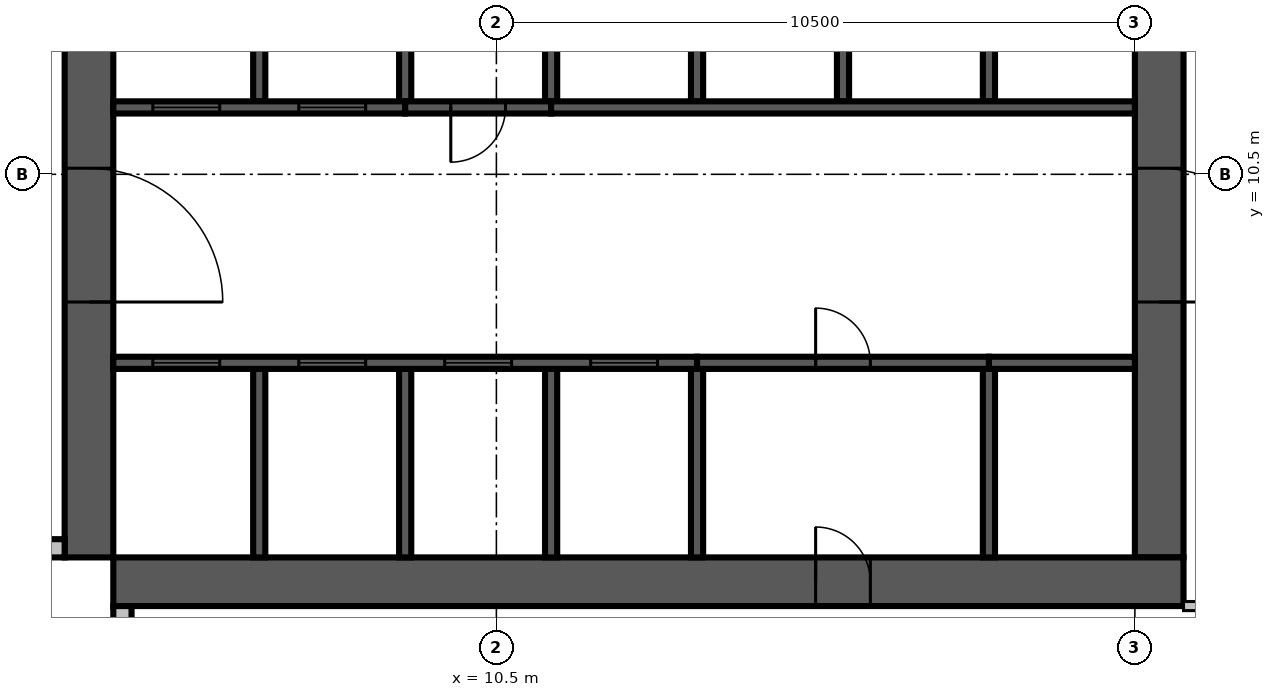
"""IFC4 building model, lengths in metres.
Left out: names, types, materials, properties, quantities, classifications, styles, units other than length and angle.
Written with IfcOpenShell. Run it as: python <this file> out.ifc"""

import sys

from ifc_helpers import new_model, si_unit, direction, frame, frame_2d, origin, place, context, subcontext, project, spatial, rectangle, extrude, source, transform, mapped, element, fill, save


model = new_model("IFC4")
c1 = context("Model", 3, precision=1e-05, world=origin(), true_north=direction((0.0, 1.0)))
c2 = subcontext(c1, "Body", "Model", "MODEL_VIEW")
j1 = project(units=[si_unit("LENGTHUNIT", "METRE"), si_unit("PLANEANGLEUNIT", "RADIAN")], contexts=[c1])
p1 = place(None, origin())
s1 = spatial("IfcSite", under=j1, at=p1, CompositionType="ELEMENT")
p2 = place(p1, origin())
s2 = spatial("IfcBuilding", under=s1, at=p2, CompositionType="ELEMENT")
p3 = place(p2, frame((0.0, 0.0, 234.8)))
s3 = spatial("IfcBuildingStorey", under=s2, at=p3, CompositionType="ELEMENT", Elevation=234.8)
m1 = source(origin(), c2, "Body", "SweptSolid", [
    extrude(rectangle(XDim=17.6, YDim=0.8, at=frame_2d((8.8, 0.0))), origin(), (0.0, 0.0, 1.0), 3.8),
])
p4 = place(p3, frame((3.8, 4.2, 0.0), z_axis=(0.0, 0.0, 1.0), x_axis=(0.0, 1.0, 0.0)))
e1 = element("IfcWall", 1, at=p4, inside=s3, PredefinedType="SHEAR", context=c2, shape_type="MappedRepresentation", body=[
    mapped(m1, transform((0.0, 0.0, 0.0), scale=1.0)),
])
m2 = source(origin(), c2, "Body", "SweptSolid", [
    extrude(rectangle(XDim=2.2, YDim=2.1, at=frame_2d((1.1, 1.05))), frame((0.0, 0.41, 0.0), z_axis=(0.0, -1.0, 0.0), x_axis=(1.0, 0.0, 0.0)), (0.0, 0.0, 1.0), 0.82),
])
p5 = place(p4, frame((4.2, 0.0, 0.0)))
e2 = element("IfcOpeningElement", 2, at=p5, cuts=e1, PredefinedType="OPENING", context=c2, shape_type="MappedRepresentation", body=[
    mapped(m2, transform((0.0, 0.0, 0.0), scale=1.0)),
])
m3 = source(origin(), c2, "Body", "SweptSolid", [
    extrude(rectangle(XDim=0.9, YDim=2.1, at=frame_2d((0.45, 1.05))), frame((0.0, 0.41, 0.0), z_axis=(0.0, -1.0, 0.0), x_axis=(1.0, 0.0, 0.0)), (0.0, 0.0, 1.0), 0.82),
])
p6 = place(p4, frame((10.95, 0.0, 0.0)))
e3 = element("IfcOpeningElement", 3, at=p6, cuts=e1, PredefinedType="OPENING", context=c2, shape_type="MappedRepresentation", body=[
    mapped(m3, transform((0.0, 0.0, 0.0), scale=1.0)),
])
m4 = source(origin(), c2, "Body", "SweptSolid", [
    extrude(rectangle(XDim=16.8, YDim=0.8, at=frame_2d((8.4, 0.0))), origin(), (0.0, 0.0, 1.0), 3.8),
])
p7 = place(p3, frame((21.4, 4.2, 0.0), z_axis=(0.0, 0.0, 1.0), x_axis=(0.0, 1.0, 0.0)))
e4 = element("IfcWall", 4, at=p7, inside=s3, PredefinedType="SHEAR", context=c2, shape_type="MappedRepresentation", body=[
    mapped(m4, transform((0.0, 0.0, 0.0), scale=1.0)),
])
p8 = place(p7, frame((4.2, 0.0, 0.0)))
e5 = element("IfcOpeningElement", 5, at=p8, cuts=e4, PredefinedType="OPENING", context=c2, shape_type="MappedRepresentation", body=[
    mapped(m2, transform((0.0, 0.0, 0.0), scale=1.0)),
])
m5 = source(origin(), c2, "Body", "SweptSolid", [
    extrude(rectangle(XDim=1.2, YDim=2.1, at=frame_2d((0.6, 1.05))), frame((0.0, 0.41, 0.0), z_axis=(0.0, -1.0, 0.0), x_axis=(1.0, 0.0, 0.0)), (0.0, 0.0, 1.0), 0.82),
])
p9 = place(p7, frame((14.7, 0.0, 0.0)))
e6 = element("IfcOpeningElement", 6, at=p9, cuts=e4, PredefinedType="OPENING", context=c2, shape_type="MappedRepresentation", body=[
    mapped(m5, transform((0.0, 0.0, 0.0), scale=1.0)),
])
p10 = place(p3, frame((4.2, 3.8, 0.0), z_axis=(0.0, 0.0, 1.0), x_axis=(1.0, 0.0, 0.0)))
e7 = element("IfcWall", 7, at=p10, inside=s3, PredefinedType="SHEAR", context=c2, shape_type="MappedRepresentation", body=[
    mapped(m1, transform((0.0, 0.0, 0.0), scale=1.0)),
])
p11 = place(p10, frame((11.55, 0.0, 0.0)))
e8 = element("IfcOpeningElement", 8, at=p11, cuts=e7, PredefinedType="OPENING", context=c2, shape_type="MappedRepresentation", body=[
    mapped(m3, transform((0.0, 0.0, 0.0), scale=1.0)),
])
m6 = source(origin(), c2, "Body", "SweptSolid", [
    extrude(rectangle(XDim=3.4, YDim=0.3, at=frame_2d((1.7, 0.0))), origin(), (0.0, 0.0, 1.0), 3.4),
])
p12 = place(p3, frame((0.0, 4.35, 0.0), z_axis=(0.0, 0.0, 1.0), x_axis=(1.0, 0.0, 0.0)))
e9 = element("IfcWall", 9, at=p12, inside=s3, PredefinedType="STANDARD", context=c2, shape_type="MappedRepresentation", body=[
    mapped(m6, transform((0.0, 0.0, 0.0), scale=1.0)),
])
m7 = source(origin(), c2, "Body", "SweptSolid", [
    extrude(rectangle(XDim=1.8, YDim=2.3, at=frame_2d((0.9, 1.15))), frame((0.0, 0.16, 0.0), z_axis=(0.0, -1.0, 0.0), x_axis=(1.0, 0.0, 0.0)), (0.0, 0.0, 1.0), 0.32),
])
p13 = place(p12, frame((1.2, 0.0, 0.6)))
e10 = element("IfcOpeningElement", 10, at=p13, cuts=e9, PredefinedType="OPENING", context=c2, shape_type="MappedRepresentation", body=[
    mapped(m7, transform((0.0, 0.0, 0.0), scale=1.0)),
])
p14 = place(p3, frame((4.35, 3.4, 0.0), z_axis=(0.0, 0.0, 1.0), x_axis=(0.0, -1.0, 0.0)))
e11 = element("IfcWall", 11, at=p14, inside=s3, PredefinedType="STANDARD", context=c2, shape_type="MappedRepresentation", body=[
    mapped(m6, transform((0.0, 0.0, 0.0), scale=1.0)),
])
p15 = place(p14, frame((0.4, 0.0, 0.6)))
e12 = element("IfcOpeningElement", 12, at=p15, cuts=e11, PredefinedType="OPENING", context=c2, shape_type="MappedRepresentation", body=[
    mapped(m7, transform((0.0, 0.0, 0.0), scale=1.0)),
])
m8 = source(origin(), c2, "Body", "SweptSolid", [
    extrude(rectangle(XDim=3.1, YDim=0.2, at=frame_2d((1.55, 0.0))), origin(), (0.0, 0.0, 1.0), 3.8),
])
for number, where, z_axis, x_axis in (
    (13, (6.6, 4.2, 0.0), (0.0, 0.0, 1.0), (0.0, 1.0, 0.0)),
    (14, (9.0, 4.2, 0.0), (0.0, 0.0, 1.0), (0.0, 1.0, 0.0)),
    (15, (11.4, 4.2, 0.0), (0.0, 0.0, 1.0), (0.0, 1.0, 0.0)),
):
    element("IfcWall", number, at=place(p3, frame(where, z_axis=z_axis, x_axis=x_axis)), inside=s3, PredefinedType="SOLIDWALL", context=c2, shape_type="MappedRepresentation", body=[
        mapped(m8, transform((0.0, 0.0, 0.0), scale=1.0)),
    ])
m9 = source(origin(), c2, "Body", "SweptSolid", [
    extrude(rectangle(XDim=3.1, YDim=0.2, at=frame_2d((1.55, 0.0))), origin(), (0.0, 0.0, 1.0), 3.4),
])
for number, where, z_axis, x_axis in (
    (16, (13.8, 4.2, 0.0), (0.0, 0.0, 1.0), (0.0, 1.0, 0.0)),
    (17, (18.6, 4.2, 0.0), (0.0, 0.0, 1.0), (0.0, 1.0, 0.0)),
):
    element("IfcWall", number, at=place(p3, frame(where, z_axis=z_axis, x_axis=x_axis)), inside=s3, PredefinedType="SOLIDWALL", context=c2, shape_type="MappedRepresentation", body=[
        mapped(m9, transform((0.0, 0.0, 0.0), scale=1.0)),
    ])
m10 = source(origin(), c2, "Body", "SweptSolid", [
    extrude(rectangle(XDim=3.0, YDim=0.2, at=frame_2d((1.5, 0.0))), origin(), (0.0, 0.0, 1.0), 3.8),
])
p16 = place(p3, frame((6.6, 11.7, 0.0), z_axis=(0.0, 0.0, 1.0), x_axis=(0.0, 1.0, 0.0)))
e18 = element("IfcWall", 18, at=p16, inside=s3, PredefinedType="SOLIDWALL", context=c2, shape_type="MappedRepresentation", body=[
    mapped(m10, transform((0.0, 0.0, 0.0), scale=1.0)),
])
m11 = source(origin(), c2, "Body", "SweptSolid", [
    extrude(rectangle(XDim=3.0, YDim=0.2, at=frame_2d((1.5, 0.0))), origin(), (0.0, 0.0, 1.0), 3.4),
])
for number, where, z_axis, x_axis in (
    (19, (9.0, 11.7, 0.0), (0.0, 0.0, 1.0), (0.0, 1.0, 0.0)),
    (20, (11.4, 11.7, 0.0), (0.0, 0.0, 1.0), (0.0, 1.0, 0.0)),
):
    element("IfcWall", number, at=place(p3, frame(where, z_axis=z_axis, x_axis=x_axis)), inside=s3, PredefinedType="SOLIDWALL", context=c2, shape_type="MappedRepresentation", body=[
        mapped(m11, transform((0.0, 0.0, 0.0), scale=1.0)),
    ])
for number, where, z_axis, x_axis in (
    (21, (13.8, 11.7, 0.0), (0.0, 0.0, 1.0), (0.0, 1.0, 0.0)),
    (22, (16.2, 11.7, 0.0), (0.0, 0.0, 1.0), (0.0, 1.0, 0.0)),
    (23, (18.6, 11.7, 0.0), (0.0, 0.0, 1.0), (0.0, 1.0, 0.0)),
):
    element("IfcWall", number, at=place(p3, frame(where, z_axis=z_axis, x_axis=x_axis)), inside=s3, PredefinedType="SOLIDWALL", context=c2, shape_type="MappedRepresentation", body=[
        mapped(m10, transform((0.0, 0.0, 0.0), scale=1.0)),
    ])
m12 = source(origin(), c2, "Body", "SweptSolid", [
    extrude(rectangle(XDim=9.6, YDim=0.2, at=frame_2d((4.8, 0.0))), origin(), (0.0, 0.0, 1.0), 3.8),
])
p17 = place(p3, frame((4.2, 7.4, 0.0), z_axis=(0.0, 0.0, 1.0), x_axis=(1.0, 0.0, 0.0)))
e24 = element("IfcWall", 24, at=p17, inside=s3, PredefinedType="SOLIDWALL", context=c2, shape_type="MappedRepresentation", body=[
    mapped(m12, transform((0.0, 0.0, 0.0), scale=1.0)),
])
m13 = source(origin(), c2, "Body", "SweptSolid", [
    extrude(rectangle(XDim=1.1, YDim=2.1, at=frame_2d((0.55, 1.05))), frame((0.0, 0.11, 0.0), z_axis=(0.0, -1.0, 0.0), x_axis=(1.0, 0.0, 0.0)), (0.0, 0.0, 1.0), 0.22),
])
p18 = place(p17, frame((0.65, 0.0, 0.0)))
e25 = element("IfcOpeningElement", 25, at=p18, cuts=e24, PredefinedType="OPENING", context=c2, shape_type="MappedRepresentation", body=[
    mapped(m13, transform((0.0, 0.0, 0.0), scale=1.0)),
])
p19 = place(p17, frame((3.05, 0.0, 0.0)))
e26 = element("IfcOpeningElement", 26, at=p19, cuts=e24, PredefinedType="OPENING", context=c2, shape_type="MappedRepresentation", body=[
    mapped(m13, transform((0.0, 0.0, 0.0), scale=1.0)),
])
p20 = place(p17, frame((5.45, 0.0, 0.0)))
e27 = element("IfcOpeningElement", 27, at=p20, cuts=e24, PredefinedType="OPENING", context=c2, shape_type="MappedRepresentation", body=[
    mapped(m13, transform((0.0, 0.0, 0.0), scale=1.0)),
])
p21 = place(p17, frame((7.85, 0.0, 0.0)))
e28 = element("IfcOpeningElement", 28, at=p21, cuts=e24, PredefinedType="OPENING", context=c2, shape_type="MappedRepresentation", body=[
    mapped(m13, transform((0.0, 0.0, 0.0), scale=1.0)),
])
m14 = source(origin(), c2, "Body", "SweptSolid", [
    extrude(rectangle(XDim=4.8, YDim=0.2, at=frame_2d((2.4, 0.0))), origin(), (0.0, 0.0, 1.0), 3.4),
])
p22 = place(p3, frame((13.8, 7.4, 0.0), z_axis=(0.0, 0.0, 1.0), x_axis=(1.0, 0.0, 0.0)))
e29 = element("IfcWall", 29, at=p22, inside=s3, PredefinedType="SOLIDWALL", context=c2, shape_type="MappedRepresentation", body=[
    mapped(m14, transform((0.0, 0.0, 0.0), scale=1.0)),
])
m15 = source(origin(), c2, "Body", "SweptSolid", [
    extrude(rectangle(XDim=0.9, YDim=2.1, at=frame_2d((0.45, 1.05))), frame((0.0, 0.11, 0.0), z_axis=(0.0, -1.0, 0.0), x_axis=(1.0, 0.0, 0.0)), (0.0, 0.0, 1.0), 0.22),
])
p23 = place(p22, frame((1.95, 0.0, 0.0)))
e30 = element("IfcOpeningElement", 30, at=p23, cuts=e29, PredefinedType="OPENING", context=c2, shape_type="MappedRepresentation", body=[
    mapped(m15, transform((0.0, 0.0, 0.0), scale=1.0)),
])
m16 = source(origin(), c2, "Body", "SweptSolid", [
    extrude(rectangle(XDim=2.4, YDim=0.2, at=frame_2d((1.2, 0.0))), origin(), (0.0, 0.0, 1.0), 3.8),
])
p24 = place(p3, frame((18.6, 7.4, 0.0), z_axis=(0.0, 0.0, 1.0), x_axis=(1.0, 0.0, 0.0)))
e31 = element("IfcWall", 31, at=p24, inside=s3, PredefinedType="SOLIDWALL", context=c2, shape_type="MappedRepresentation", body=[
    mapped(m16, transform((0.0, 0.0, 0.0), scale=1.0)),
])
m17 = source(origin(), c2, "Body", "SweptSolid", [
    extrude(rectangle(XDim=4.8, YDim=0.2, at=frame_2d((2.4, 0.0))), origin(), (0.0, 0.0, 1.0), 3.8),
])
p25 = place(p3, frame((4.2, 11.6, 0.0), z_axis=(0.0, 0.0, 1.0), x_axis=(1.0, 0.0, 0.0)))
e32 = element("IfcWall", 32, at=p25, inside=s3, PredefinedType="SOLIDWALL", context=c2, shape_type="MappedRepresentation", body=[
    mapped(m17, transform((0.0, 0.0, 0.0), scale=1.0)),
])
p26 = place(p25, frame((0.65, 0.0, 0.0)))
e33 = element("IfcOpeningElement", 33, at=p26, cuts=e32, PredefinedType="OPENING", context=c2, shape_type="MappedRepresentation", body=[
    mapped(m13, transform((0.0, 0.0, 0.0), scale=1.0)),
])
p27 = place(p25, frame((3.05, 0.0, 0.0)))
e34 = element("IfcOpeningElement", 34, at=p27, cuts=e32, PredefinedType="OPENING", context=c2, shape_type="MappedRepresentation", body=[
    mapped(m13, transform((0.0, 0.0, 0.0), scale=1.0)),
])
m18 = source(origin(), c2, "Body", "SweptSolid", [
    extrude(rectangle(XDim=2.4, YDim=0.2, at=frame_2d((1.2, 0.0))), origin(), (0.0, 0.0, 1.0), 3.4),
])
p28 = place(p3, frame((9.0, 11.6, 0.0), z_axis=(0.0, 0.0, 1.0), x_axis=(1.0, 0.0, 0.0)))
e35 = element("IfcWall", 35, at=p28, inside=s3, PredefinedType="SOLIDWALL", context=c2, shape_type="MappedRepresentation", body=[
    mapped(m18, transform((0.0, 0.0, 0.0), scale=1.0)),
])
p29 = place(p28, frame((0.75, 0.0, 0.0)))
e36 = element("IfcOpeningElement", 36, at=p29, cuts=e35, PredefinedType="OPENING", context=c2, shape_type="MappedRepresentation", body=[
    mapped(m15, transform((0.0, 0.0, 0.0), scale=1.0)),
])
p30 = place(p3, frame((11.4, 11.6, 0.0), z_axis=(0.0, 0.0, 1.0), x_axis=(1.0, 0.0, 0.0)))
e37 = element("IfcWall", 37, at=p30, inside=s3, PredefinedType="SOLIDWALL", context=c2, shape_type="MappedRepresentation", body=[
    mapped(m12, transform((0.0, 0.0, 0.0), scale=1.0)),
])
m19 = source(origin(), c2, "Body", "SweptSolid", [
    extrude(rectangle(XDim=7.525, YDim=0.15, at=frame_2d((3.763, 0.0))), origin(), (0.0, 0.0, 1.0), 3.4),
])
p31 = place(p3, frame((21.8, 3.4, 0.0), z_axis=(0.0, 0.0, 1.0), x_axis=(1.0, 0.0, 0.0)))
e38 = element("IfcWall", 38, at=p31, inside=s3, PredefinedType="PARTITIONING", context=c2, shape_type="MappedRepresentation", body=[
    mapped(m19, transform((0.0, 0.0, 0.0), scale=1.0)),
])
m20 = source(origin(), c2, "Body", "SweptSolid", [
    extrude(rectangle(XDim=1.0, YDim=2.1, at=frame_2d((0.5, 1.05))), frame((0.0, 0.085, 0.0), z_axis=(0.0, -1.0, 0.0), x_axis=(1.0, 0.0, 0.0)), (0.0, 0.0, 1.0), 0.17),
])
p32 = place(p31, frame((3.6, 0.0, 0.0)))
e39 = element("IfcOpeningElement", 39, at=p32, cuts=e38, PredefinedType="OPENING", context=c2, shape_type="MappedRepresentation", body=[
    mapped(m20, transform((0.0, 0.0, 0.0), scale=1.0)),
])
m21 = source(origin(), c2, "Body", "SweptSolid", [
    extrude(rectangle(XDim=0.9, YDim=2.1, at=frame_2d((0.45, 1.05))), frame((0.0, 0.085, 0.0), z_axis=(0.0, -1.0, 0.0), x_axis=(1.0, 0.0, 0.0)), (0.0, 0.0, 1.0), 0.17),
])
p33 = place(p31, frame((2.312, 0.0, 0.0)))
e40 = element("IfcOpeningElement", 40, at=p33, cuts=e38, PredefinedType="OPENING", context=c2, shape_type="MappedRepresentation", body=[
    mapped(m21, transform((0.0, 0.0, 0.0), scale=1.0)),
])
m22 = source(origin(), c2, "Body", "SweptSolid", [
    extrude(rectangle(XDim=1.1, YDim=2.1, at=frame_2d((0.55, 1.05))), frame((0.0, 0.025, 0.0), z_axis=(0.0, -1.0, 0.0), x_axis=(1.0, 0.0, 0.0)), (0.0, 0.0, 1.0), 0.05),
])
p34 = place(p18, origin())
e41 = element("IfcDoor", 41, at=p34, inside=s3, OperationType="SLIDING_TO_LEFT", PredefinedType="DOOR", context=c2, shape_type="MappedRepresentation", body=[
    mapped(m22, transform((0.0, 0.0, 0.0), scale=1.0)),
])
fill(e25, e41)
p35 = place(p19, origin())
e42 = element("IfcDoor", 42, at=p35, inside=s3, OperationType="SLIDING_TO_LEFT", PredefinedType="DOOR", context=c2, shape_type="MappedRepresentation", body=[
    mapped(m22, transform((0.0, 0.0, 0.0), scale=1.0)),
])
fill(e26, e42)
p36 = place(p20, origin())
e43 = element("IfcDoor", 43, at=p36, inside=s3, OperationType="SLIDING_TO_LEFT", PredefinedType="DOOR", context=c2, shape_type="MappedRepresentation", body=[
    mapped(m22, transform((0.0, 0.0, 0.0), scale=1.0)),
])
fill(e27, e43)
p37 = place(p21, origin())
e44 = element("IfcDoor", 44, at=p37, inside=s3, OperationType="SLIDING_TO_LEFT", PredefinedType="DOOR", context=c2, shape_type="MappedRepresentation", body=[
    mapped(m22, transform((0.0, 0.0, 0.0), scale=1.0)),
])
fill(e28, e44)
m23 = source(origin(), c2, "Body", "SweptSolid", [
    extrude(rectangle(XDim=0.9, YDim=2.1, at=frame_2d((0.45, 1.05))), frame((0.0, 0.025, 0.0), z_axis=(0.0, -1.0, 0.0), x_axis=(1.0, 0.0, 0.0)), (0.0, 0.0, 1.0), 0.05),
])
p38 = place(p23, origin())
e45 = element("IfcDoor", 45, at=p38, inside=s3, OperationType="SINGLE_SWING_LEFT", PredefinedType="DOOR", context=c2, shape_type="MappedRepresentation", body=[
    mapped(m23, transform((0.0, 0.0, 0.0), scale=1.0)),
])
fill(e30, e45)
p39 = place(p26, origin())
e46 = element("IfcDoor", 46, at=p39, inside=s3, OperationType="SLIDING_TO_LEFT", PredefinedType="DOOR", context=c2, shape_type="MappedRepresentation", body=[
    mapped(m22, transform((0.0, 0.0, 0.0), scale=1.0)),
])
fill(e33, e46)
p40 = place(p27, origin())
e47 = element("IfcDoor", 47, at=p40, inside=s3, OperationType="SLIDING_TO_LEFT", PredefinedType="DOOR", context=c2, shape_type="MappedRepresentation", body=[
    mapped(m22, transform((0.0, 0.0, 0.0), scale=1.0)),
])
fill(e34, e47)
p41 = place(p29, origin())
e48 = element("IfcDoor", 48, at=p41, inside=s3, OperationType="SINGLE_SWING_RIGHT", PredefinedType="DOOR", context=c2, shape_type="MappedRepresentation", body=[
    mapped(m23, transform((0.0, 0.0, 0.0), scale=1.0)),
])
fill(e36, e48)
m24 = source(origin(), c2, "Body", "SweptSolid", [
    extrude(rectangle(XDim=2.2, YDim=2.1, at=frame_2d((1.1, 1.05))), frame((0.0, 0.025, 0.0), z_axis=(0.0, -1.0, 0.0), x_axis=(1.0, 0.0, 0.0)), (0.0, 0.0, 1.0), 0.05),
])
p42 = place(p8, origin())
e49 = element("IfcDoor", 49, at=p42, inside=s3, OperationType="DOUBLE_DOOR_SINGLE_SWING", PredefinedType="DOOR", context=c2, shape_type="MappedRepresentation", body=[
    mapped(m24, transform((0.0, 0.0, 0.0), scale=1.0)),
])
fill(e5, e49)
p43 = place(p5, origin())
e50 = element("IfcDoor", 50, at=p43, inside=s3, OperationType="DOUBLE_DOOR_SINGLE_SWING", PredefinedType="DOOR", context=c2, shape_type="MappedRepresentation", body=[
    mapped(m24, transform((0.0, 0.0, 0.0), scale=1.0)),
])
fill(e2, e50)
p44 = place(p11, origin())
e51 = element("IfcDoor", 51, at=p44, inside=s3, OperationType="SINGLE_SWING_LEFT", PredefinedType="DOOR", context=c2, shape_type="MappedRepresentation", body=[
    mapped(m23, transform((0.0, 0.0, 0.0), scale=1.0)),
])
fill(e8, e51)
save(model, sys.argv[1])
